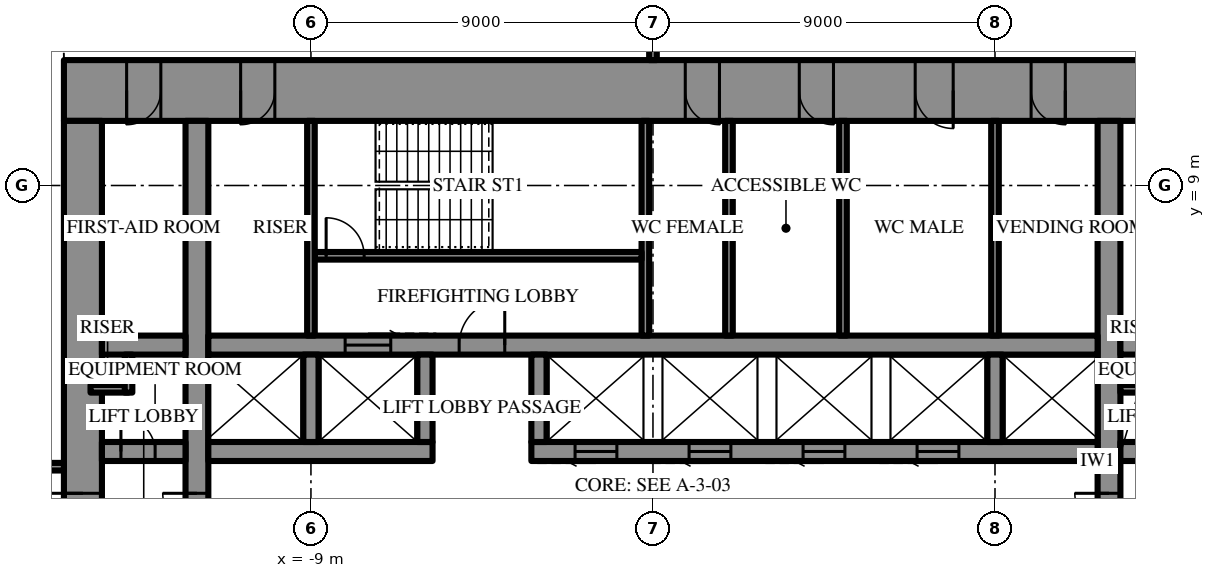
"""IFC4 building model, lengths in metres.
Left out: names, types, materials, properties, quantities, classifications, styles, units other than length and angle.
Written with IfcOpenShell. Run it as: python <this file> out.ifc"""

import sys

from ifc_helpers import new_model, si_unit, direction, frame, frame_2d, origin, place, context, subcontext, project, spatial, rectangle, extrude, element, fill, save


model = new_model("IFC4")
c1 = context("Model", 3, precision=1e-05, world=origin(), true_north=direction((0.0, 1.0)))
c2 = subcontext(c1, "Body", "Model", "MODEL_VIEW")
j1 = project(units=[si_unit("LENGTHUNIT", "METRE"), si_unit("PLANEANGLEUNIT", "RADIAN")], contexts=[c1])
p1 = place(None, origin())
s1 = spatial("IfcSite", under=j1, at=p1, CompositionType="ELEMENT")
p2 = place(p1, origin())
s2 = spatial("IfcBuilding", under=s1, at=p2, CompositionType="ELEMENT")
p3 = place(p2, frame((0.0, 0.0, 261.7)))
s3 = spatial("IfcBuildingStorey", under=s2, at=p3, CompositionType="ELEMENT", Elevation=261.7)
p4 = place(p3, frame((-15.5, 11.5, 0.0), z_axis=(0.0, 0.0, 1.0), x_axis=(1.0, 0.0, 0.0)))
e1 = element("IfcWall", 1, at=p4, inside=s3, PredefinedType="SHEAR", context=c2, shape_type="SweptSolid", body=[
    extrude(rectangle(XDim=31.0, YDim=1.6, at=frame_2d((15.5, 0.0))), origin(), (0.0, 0.0, 1.0), 4.2),
])
p5 = place(p4, frame((16.35, 0.0, 0.0)))
e2 = element("IfcOpeningElement", 2, at=p5, cuts=e1, PredefinedType="OPENING", context=c2, shape_type="SweptSolid", body=[
    extrude(rectangle(XDim=0.9, YDim=2.2, at=frame_2d((0.45, 1.1))), frame((0.0, 0.81, 0.0), z_axis=(0.0, -1.0, 0.0), x_axis=(1.0, 0.0, 0.0)), (0.0, 0.0, 1.0), 1.62),
])
p6 = place(p4, frame((19.35, 0.0, 0.0)))
e3 = element("IfcOpeningElement", 3, at=p6, cuts=e1, PredefinedType="OPENING", context=c2, shape_type="SweptSolid", body=[
    extrude(rectangle(XDim=0.9, YDim=2.2, at=frame_2d((0.45, 1.1))), frame((0.0, 0.81, 0.0), z_axis=(0.0, -1.0, 0.0), x_axis=(1.0, 0.0, 0.0)), (0.0, 0.0, 1.0), 1.62),
])
p7 = place(p4, frame((22.4, 0.0, 0.0)))
e4 = element("IfcOpeningElement", 4, at=p7, cuts=e1, PredefinedType="OPENING", context=c2, shape_type="SweptSolid", body=[
    extrude(rectangle(XDim=1.0, YDim=2.2, at=frame_2d((0.5, 1.1))), frame((0.0, 0.81, 0.0), z_axis=(0.0, -1.0, 0.0), x_axis=(1.0, 0.0, 0.0)), (0.0, 0.0, 1.0), 1.62),
])
p8 = place(p4, frame((1.65, 0.0, 0.0)))
e5 = element("IfcOpeningElement", 5, at=p8, cuts=e1, PredefinedType="OPENING", context=c2, shape_type="SweptSolid", body=[
    extrude(rectangle(XDim=0.9, YDim=2.2, at=frame_2d((0.45, 1.1))), frame((0.0, 0.81, 0.0), z_axis=(0.0, -1.0, 0.0), x_axis=(1.0, 0.0, 0.0)), (0.0, 0.0, 1.0), 1.62),
])
p9 = place(p4, frame((4.65, 0.0, 0.0)))
e6 = element("IfcOpeningElement", 6, at=p9, cuts=e1, PredefinedType="OPENING", context=c2, shape_type="SweptSolid", body=[
    extrude(rectangle(XDim=0.9, YDim=2.2, at=frame_2d((0.45, 1.1))), frame((0.0, 0.81, 0.0), z_axis=(0.0, -1.0, 0.0), x_axis=(1.0, 0.0, 0.0)), (0.0, 0.0, 1.0), 1.62),
])
p10 = place(p4, frame((25.45, 0.0, 0.0)))
e7 = element("IfcOpeningElement", 7, at=p10, cuts=e1, PredefinedType="OPENING", context=c2, shape_type="SweptSolid", body=[
    extrude(rectangle(XDim=0.9, YDim=2.2, at=frame_2d((0.45, 1.1))), frame((0.0, 0.81, 0.0), z_axis=(0.0, -1.0, 0.0), x_axis=(1.0, 0.0, 0.0)), (0.0, 0.0, 1.0), 1.62),
])
p11 = place(p4, frame((28.45, 0.0, 0.0)))
e8 = element("IfcOpeningElement", 8, at=p11, cuts=e1, PredefinedType="OPENING", context=c2, shape_type="SweptSolid", body=[
    extrude(rectangle(XDim=0.9, YDim=2.2, at=frame_2d((0.45, 1.1))), frame((0.0, 0.81, 0.0), z_axis=(0.0, -1.0, 0.0), x_axis=(1.0, 0.0, 0.0)), (0.0, 0.0, 1.0), 1.62),
])
p12 = place(p3, frame((-15.0, 10.7, 0.0), z_axis=(0.0, 0.0, 1.0), x_axis=(0.0, -1.0, 0.0)))
e9 = element("IfcWall", 9, at=p12, inside=s3, PredefinedType="SHEAR", context=c2, shape_type="SweptSolid", body=[
    extrude(rectangle(XDim=21.4, YDim=1.0, at=frame_2d((10.7, 0.0))), origin(), (0.0, 0.0, 1.0), 4.2),
])
p13 = place(p12, frame((9.8, 0.0, 0.0)))
e10 = element("IfcOpeningElement", 10, at=p13, cuts=e9, PredefinedType="OPENING", context=c2, shape_type="SweptSolid", body=[
    extrude(rectangle(XDim=1.8, YDim=2.4, at=frame_2d((0.9, 1.2))), frame((0.0, 0.51, 0.0), z_axis=(0.0, -1.0, 0.0), x_axis=(1.0, 0.0, 0.0)), (0.0, 0.0, 1.0), 1.02),
])
p14 = place(p3, frame((12.0, -10.7, 0.0), z_axis=(0.0, 0.0, 1.0), x_axis=(0.0, 1.0, 0.0)))
e11 = element("IfcWall", 11, at=p14, inside=s3, PredefinedType="SHEAR", context=c2, shape_type="SweptSolid", body=[
    extrude(rectangle(XDim=21.4, YDim=0.6, at=frame_2d((10.7, 0.0))), origin(), (0.0, 0.0, 1.0), 4.2),
])
p15 = place(p14, frame((9.8, 0.0, 0.0)))
e12 = element("IfcOpeningElement", 12, at=p15, cuts=e11, PredefinedType="OPENING", context=c2, shape_type="SweptSolid", body=[
    extrude(rectangle(XDim=1.8, YDim=2.4, at=frame_2d((0.9, 1.2))), frame((0.0, 0.31, 0.0), z_axis=(0.0, -1.0, 0.0), x_axis=(1.0, 0.0, 0.0)), (0.0, 0.0, 1.0), 0.62),
])
p16 = place(p3, frame((-12.0, -10.7, 0.0), z_axis=(0.0, 0.0, 1.0), x_axis=(0.0, 1.0, 0.0)))
e13 = element("IfcWall", 13, at=p16, inside=s3, PredefinedType="SHEAR", context=c2, shape_type="SweptSolid", body=[
    extrude(rectangle(XDim=21.4, YDim=0.6, at=frame_2d((10.7, 0.0))), origin(), (0.0, 0.0, 1.0), 4.2),
])
p17 = place(p16, frame((9.8, 0.0, 0.0)))
e14 = element("IfcOpeningElement", 14, at=p17, cuts=e13, PredefinedType="OPENING", context=c2, shape_type="SweptSolid", body=[
    extrude(rectangle(XDim=1.8, YDim=2.4, at=frame_2d((0.9, 1.2))), frame((0.0, 0.31, 0.0), z_axis=(0.0, -1.0, 0.0), x_axis=(1.0, 0.0, 0.0)), (0.0, 0.0, 1.0), 0.62),
])
p18 = place(p3, frame((-14.5, 2.0, 0.0), z_axis=(0.0, 0.0, 1.0), x_axis=(1.0, 0.0, 0.0)))
e15 = element("IfcWall", 15, at=p18, inside=s3, PredefinedType="SHEAR", context=c2, shape_type="SweptSolid", body=[
    extrude(rectangle(XDim=2.2, YDim=0.5, at=frame_2d((1.1, 0.0))), origin(), (0.0, 0.0, 1.0), 4.2),
])
p19 = place(p18, frame((0.5, 0.0, 0.0)))
e16 = element("IfcOpeningElement", 16, at=p19, cuts=e15, PredefinedType="OPENING", context=c2, shape_type="SweptSolid", body=[
    extrude(rectangle(XDim=0.9, YDim=2.2, at=frame_2d((0.45, 1.1))), frame((0.0, 0.26, 0.0), z_axis=(0.0, -1.0, 0.0), x_axis=(1.0, 0.0, 0.0)), (0.0, 0.0, 1.0), 0.52),
])
p20 = place(p3, frame((-11.7, 2.0, 0.0), z_axis=(0.0, 0.0, 1.0), x_axis=(1.0, 0.0, 0.0)))
e17 = element("IfcWall", 17, at=p20, inside=s3, PredefinedType="SHEAR", context=c2, shape_type="SweptSolid", body=[
    extrude(rectangle(XDim=5.9, YDim=0.5, at=frame_2d((2.95, 0.0))), origin(), (0.0, 0.0, 1.0), 4.2),
])
p21 = place(p3, frame((-3.2, 2.0, 0.0), z_axis=(0.0, 0.0, 1.0), x_axis=(1.0, 0.0, 0.0)))
e18 = element("IfcWall", 18, at=p21, inside=s3, PredefinedType="SHEAR", context=c2, shape_type="SweptSolid", body=[
    extrude(rectangle(XDim=14.9, YDim=0.5, at=frame_2d((7.45, 0.0))), origin(), (0.0, 0.0, 1.0), 4.2),
])
p22 = place(p21, frame((1.15, 0.0, 0.0)))
e19 = element("IfcOpeningElement", 19, at=p22, cuts=e18, PredefinedType="OPENING", context=c2, shape_type="SweptSolid", body=[
    extrude(rectangle(XDim=1.1, YDim=2.2, at=frame_2d((0.55, 1.1))), frame((0.0, 0.26, 0.0), z_axis=(0.0, -1.0, 0.0), x_axis=(1.0, 0.0, 0.0)), (0.0, 0.0, 1.0), 0.52),
])
p23 = place(p21, frame((4.15, 0.0, 0.0)))
e20 = element("IfcOpeningElement", 20, at=p23, cuts=e18, PredefinedType="OPENING", context=c2, shape_type="SweptSolid", body=[
    extrude(rectangle(XDim=1.1, YDim=2.2, at=frame_2d((0.55, 1.1))), frame((0.0, 0.26, 0.0), z_axis=(0.0, -1.0, 0.0), x_axis=(1.0, 0.0, 0.0)), (0.0, 0.0, 1.0), 0.52),
])
p24 = place(p21, frame((7.15, 0.0, 0.0)))
e21 = element("IfcOpeningElement", 21, at=p24, cuts=e18, PredefinedType="OPENING", context=c2, shape_type="SweptSolid", body=[
    extrude(rectangle(XDim=1.1, YDim=2.2, at=frame_2d((0.55, 1.1))), frame((0.0, 0.26, 0.0), z_axis=(0.0, -1.0, 0.0), x_axis=(1.0, 0.0, 0.0)), (0.0, 0.0, 1.0), 0.52),
])
p25 = place(p21, frame((10.15, 0.0, 0.0)))
e22 = element("IfcOpeningElement", 22, at=p25, cuts=e18, PredefinedType="OPENING", context=c2, shape_type="SweptSolid", body=[
    extrude(rectangle(XDim=1.1, YDim=2.2, at=frame_2d((0.55, 1.1))), frame((0.0, 0.26, 0.0), z_axis=(0.0, -1.0, 0.0), x_axis=(1.0, 0.0, 0.0)), (0.0, 0.0, 1.0), 0.52),
])
p26 = place(p3, frame((12.3, 2.0, 0.0), z_axis=(0.0, 0.0, 1.0), x_axis=(1.0, 0.0, 0.0)))
e23 = element("IfcWall", 23, at=p26, inside=s3, PredefinedType="SHEAR", context=c2, shape_type="SweptSolid", body=[
    extrude(rectangle(XDim=2.2, YDim=0.5, at=frame_2d((1.1, 0.0))), origin(), (0.0, 0.0, 1.0), 4.2),
])
p27 = place(p26, frame((0.8, 0.0, 0.0)))
e24 = element("IfcOpeningElement", 24, at=p27, cuts=e23, PredefinedType="OPENING", context=c2, shape_type="SweptSolid", body=[
    extrude(rectangle(XDim=0.9, YDim=2.2, at=frame_2d((0.45, 1.1))), frame((0.0, 0.26, 0.0), z_axis=(0.0, -1.0, 0.0), x_axis=(1.0, 0.0, 0.0)), (0.0, 0.0, 1.0), 0.52),
])
p28 = place(p3, frame((-14.5, 4.8, 0.0), z_axis=(0.0, 0.0, 1.0), x_axis=(1.0, 0.0, 0.0)))
e25 = element("IfcWall", 25, at=p28, inside=s3, PredefinedType="SHEAR", context=c2, shape_type="SweptSolid", body=[
    extrude(rectangle(XDim=2.2, YDim=0.5, at=frame_2d((1.1, 0.0))), origin(), (0.0, 0.0, 1.0), 4.2),
])
p29 = place(p3, frame((-11.7, 4.8, 0.0), z_axis=(0.0, 0.0, 1.0), x_axis=(1.0, 0.0, 0.0)))
e26 = element("IfcWall", 26, at=p29, inside=s3, PredefinedType="SHEAR", context=c2, shape_type="SweptSolid", body=[
    extrude(rectangle(XDim=23.4, YDim=0.5, at=frame_2d((11.7, 0.0))), origin(), (0.0, 0.0, 1.0), 4.2),
])
p30 = place(p29, frame((6.6, 0.0, 0.0)))
e27 = element("IfcOpeningElement", 27, at=p30, cuts=e26, PredefinedType="OPENING", context=c2, shape_type="SweptSolid", body=[
    extrude(rectangle(XDim=1.2, YDim=2.2, at=frame_2d((0.6, 1.1))), frame((0.0, 0.26, 0.0), z_axis=(0.0, -1.0, 0.0), x_axis=(1.0, 0.0, 0.0)), (0.0, 0.0, 1.0), 0.52),
])
p31 = place(p29, frame((3.6, 0.0, 0.0)))
e28 = element("IfcOpeningElement", 28, at=p31, cuts=e26, PredefinedType="OPENING", context=c2, shape_type="SweptSolid", body=[
    extrude(rectangle(XDim=1.2, YDim=2.2, at=frame_2d((0.6, 1.1))), frame((0.0, 0.26, 0.0), z_axis=(0.0, -1.0, 0.0), x_axis=(1.0, 0.0, 0.0)), (0.0, 0.0, 1.0), 0.52),
])
p32 = place(p3, frame((12.3, 4.8, 0.0), z_axis=(0.0, 0.0, 1.0), x_axis=(1.0, 0.0, 0.0)))
e29 = element("IfcWall", 29, at=p32, inside=s3, PredefinedType="SHEAR", context=c2, shape_type="SweptSolid", body=[
    extrude(rectangle(XDim=2.2, YDim=0.5, at=frame_2d((1.1, 0.0))), origin(), (0.0, 0.0, 1.0), 4.2),
])
for number, where, z_axis, x_axis in (
    (30, (-9.0, 2.25, 0.0), (0.0, 0.0, 1.0), (0.0, 1.0, 0.0)),
    (31, (-6.0, 2.25, 0.0), (0.0, 0.0, 1.0), (0.0, 1.0, 0.0)),
    (32, (-3.0, 2.25, 0.0), (0.0, 0.0, 1.0), (0.0, 1.0, 0.0)),
    (33, (9.0, 2.25, 0.0), (0.0, 0.0, 1.0), (0.0, 1.0, 0.0)),
):
    element("IfcWall", number, at=place(p3, frame(where, z_axis=z_axis, x_axis=x_axis)), inside=s3, PredefinedType="SHEAR", context=c2, shape_type="SweptSolid", body=[
        extrude(rectangle(XDim=2.3, YDim=0.4, at=frame_2d((1.15, 0.0))), origin(), (0.0, 0.0, 1.0), 4.2),
    ])
p33 = place(p3, frame((-0.2, 5.05, 0.0), z_axis=(0.0, 0.0, 1.0), x_axis=(0.0, 1.0, 0.0)))
e34 = element("IfcWall", 34, at=p33, inside=s3, PredefinedType="SHEAR", context=c2, shape_type="SweptSolid", body=[
    extrude(rectangle(XDim=5.65, YDim=0.2, at=frame_2d((2.825, 0.0))), origin(), (0.0, 0.0, 1.0), 4.2),
])
p34 = place(p3, frame((-8.9, 7.15, 0.0), z_axis=(0.0, 0.0, 1.0), x_axis=(1.0, 0.0, 0.0)))
e35 = element("IfcWall", 35, at=p34, inside=s3, PredefinedType="SHEAR", context=c2, shape_type="SweptSolid", body=[
    extrude(rectangle(XDim=8.6, YDim=0.2, at=frame_2d((4.3, 0.0))), origin(), (0.0, 0.0, 1.0), 4.2),
])
p35 = place(p34, frame((0.3, 0.0, 0.0)))
e36 = element("IfcOpeningElement", 36, at=p35, cuts=e35, PredefinedType="OPENING", context=c2, shape_type="SweptSolid", body=[
    extrude(rectangle(XDim=1.0, YDim=2.2, at=frame_2d((0.5, 1.1))), frame((0.0, 0.11, 0.0), z_axis=(0.0, -1.0, 0.0), x_axis=(1.0, 0.0, 0.0)), (0.0, 0.0, 1.0), 0.22),
])
for number, where, z_axis, x_axis in (
    (37, (-9.0, 5.05, 0.0), (0.0, 0.0, 1.0), (0.0, 1.0, 0.0)),
    (38, (9.0, 5.05, 0.0), (0.0, 0.0, 1.0), (0.0, 1.0, 0.0)),
    (39, (2.0, 5.05, 0.0), (0.0, 0.0, 1.0), (0.0, 1.0, 0.0)),
    (40, (5.0, 5.05, 0.0), (0.0, 0.0, 1.0), (0.0, 1.0, 0.0)),
):
    element("IfcWall", number, at=place(p3, frame(where, z_axis=z_axis, x_axis=x_axis)), inside=s3, PredefinedType="PARTITIONING", context=c2, shape_type="SweptSolid", body=[
        extrude(rectangle(XDim=5.65, YDim=0.2, at=frame_2d((2.825, 0.0))), origin(), (0.0, 0.0, 1.0), 4.0),
    ])
for number, where, z_axis, x_axis in (
    (41, (-14.8, 3.65, 0.0), (0.0, 0.0, 1.0), (1.0, 0.0, 0.0)),
    (42, (-13.8, 3.55, 0.0), (0.0, 0.0, 1.0), (0.0, 1.0, 0.0)),
    (43, (12.3, 3.65, 0.0), (0.0, 0.0, 1.0), (1.0, 0.0, 0.0)),
):
    element("IfcWall", number, at=place(p3, frame(where, z_axis=z_axis, x_axis=x_axis)), inside=s3, PredefinedType="PARTITIONING", context=c2, shape_type="SweptSolid", body=[
        extrude(rectangle(XDim=1.0, YDim=0.2, at=frame_2d((0.5, 0.0))), origin(), (0.0, 0.0, 1.0), 4.0),
    ])
p36 = place(p3, frame((-15.5, 1.6, 0.0), z_axis=(0.0, 0.0, 1.0), x_axis=(-1.0, 0.0, 0.0)))
e44 = element("IfcWall", 44, at=p36, inside=s3, PredefinedType="PARTITIONING", context=c2, shape_type="SweptSolid", body=[
    extrude(rectangle(XDim=11.7, YDim=0.2, at=frame_2d((5.85, 0.0))), origin(), (0.0, 0.0, 1.0), 4.0),
])
p37 = place(p36, frame((3.01, 0.0, 0.0)))
e45 = element("IfcOpeningElement", 45, at=p37, cuts=e44, PredefinedType="OPENING", context=c2, shape_type="SweptSolid", body=[
    extrude(rectangle(XDim=1.0, YDim=2.2, at=frame_2d((0.5, 1.1))), frame((0.0, 0.11, 0.0), z_axis=(0.0, -1.0, 0.0), x_axis=(1.0, 0.0, 0.0)), (0.0, 0.0, 1.0), 0.22),
])
p38 = place(p3, frame((0.0, 12.3, 0.0), z_axis=(0.0, 0.0, 1.0), x_axis=(0.0, 1.0, 0.0)))
e46 = element("IfcWall", 46, at=p38, inside=s3, PredefinedType="PARTITIONING", context=c2, shape_type="SweptSolid", body=[
    extrude(rectangle(XDim=15.55, YDim=0.2, at=frame_2d((7.775, 0.0))), origin(), (0.0, 0.0, 1.0), 2.992),
])
p39 = place(p38, frame((1.055, 0.0, 0.0)))
e47 = element("IfcOpeningElement", 47, at=p39, cuts=e46, PredefinedType="OPENING", context=c2, shape_type="SweptSolid", body=[
    extrude(rectangle(XDim=1.0, YDim=2.2, at=frame_2d((0.5, 1.1))), frame((0.0, 0.11, 0.0), z_axis=(0.0, -1.0, 0.0), x_axis=(1.0, 0.0, 0.0)), (0.0, 0.0, 1.0), 0.22),
])
p40 = place(p13, frame((1.8, 0.0, 0.0), z_axis=(0.0, 0.0, 1.0), x_axis=(-1.0, 0.0, 0.0)))
e48 = element("IfcDoor", 48, at=p40, inside=s3, OperationType="DOUBLE_DOOR_SINGLE_SWING", PredefinedType="DOOR", context=c2, shape_type="SweptSolid", body=[
    extrude(rectangle(XDim=1.8, YDim=2.4, at=frame_2d((0.9, 1.2))), frame((0.0, 0.025, 0.0), z_axis=(0.0, -1.0, 0.0), x_axis=(1.0, 0.0, 0.0)), (0.0, 0.0, 1.0), 0.05),
])
fill(e10, e48)
p41 = place(p30, origin())
e49 = element("IfcDoor", 49, at=p41, inside=s3, OperationType="SINGLE_SWING_LEFT", PredefinedType="DOOR", context=c2, shape_type="SweptSolid", body=[
    extrude(rectangle(XDim=1.2, YDim=2.2, at=frame_2d((0.6, 1.1))), frame((0.0, 0.025, 0.0), z_axis=(0.0, -1.0, 0.0), x_axis=(1.0, 0.0, 0.0)), (0.0, 0.0, 1.0), 0.05),
])
fill(e27, e49)
p42 = place(p35, origin())
e50 = element("IfcDoor", 50, at=p42, inside=s3, OperationType="SINGLE_SWING_RIGHT", PredefinedType="DOOR", context=c2, shape_type="SweptSolid", body=[
    extrude(rectangle(XDim=1.0, YDim=2.2, at=frame_2d((0.5, 1.1))), frame((0.0, 0.025, 0.0), z_axis=(0.0, -1.0, 0.0), x_axis=(1.0, 0.0, 0.0)), (0.0, 0.0, 1.0), 0.05),
])
fill(e36, e50)
p43 = place(p5, frame((0.9, 0.0, 0.0), z_axis=(0.0, 0.0, 1.0), x_axis=(-1.0, 0.0, 0.0)))
e51 = element("IfcDoor", 51, at=p43, inside=s3, OperationType="SINGLE_SWING_RIGHT", PredefinedType="DOOR", context=c2, shape_type="SweptSolid", body=[
    extrude(rectangle(XDim=0.9, YDim=2.2, at=frame_2d((0.45, 1.1))), frame((0.0, 0.025, 0.0), z_axis=(0.0, -1.0, 0.0), x_axis=(1.0, 0.0, 0.0)), (0.0, 0.0, 1.0), 0.05),
])
fill(e2, e51)
p44 = place(p6, frame((0.9, 0.0, 0.0), z_axis=(0.0, 0.0, 1.0), x_axis=(-1.0, 0.0, 0.0)))
e52 = element("IfcDoor", 52, at=p44, inside=s3, OperationType="SINGLE_SWING_RIGHT", PredefinedType="DOOR", context=c2, shape_type="SweptSolid", body=[
    extrude(rectangle(XDim=0.9, YDim=2.2, at=frame_2d((0.45, 1.1))), frame((0.0, 0.025, 0.0), z_axis=(0.0, -1.0, 0.0), x_axis=(1.0, 0.0, 0.0)), (0.0, 0.0, 1.0), 0.05),
])
fill(e3, e52)
p45 = place(p7, frame((1.0, 0.0, 0.0), z_axis=(0.0, 0.0, 1.0), x_axis=(-1.0, 0.0, 0.0)))
e53 = element("IfcDoor", 53, at=p45, inside=s3, OperationType="SINGLE_SWING_RIGHT", PredefinedType="DOOR", context=c2, shape_type="SweptSolid", body=[
    extrude(rectangle(XDim=1.0, YDim=2.2, at=frame_2d((0.5, 1.1))), frame((0.0, 0.025, 0.0), z_axis=(0.0, -1.0, 0.0), x_axis=(1.0, 0.0, 0.0)), (0.0, 0.0, 1.0), 0.05),
])
fill(e4, e53)
p46 = place(p8, frame((0.9, 0.0, 0.0), z_axis=(0.0, 0.0, 1.0), x_axis=(-1.0, 0.0, 0.0)))
e54 = element("IfcDoor", 54, at=p46, inside=s3, OperationType="SINGLE_SWING_LEFT", PredefinedType="DOOR", context=c2, shape_type="SweptSolid", body=[
    extrude(rectangle(XDim=0.9, YDim=2.2, at=frame_2d((0.45, 1.1))), frame((0.0, 0.025, 0.0), z_axis=(0.0, -1.0, 0.0), x_axis=(1.0, 0.0, 0.0)), (0.0, 0.0, 1.0), 0.05),
])
fill(e5, e54)
p47 = place(p9, frame((0.9, 0.0, 0.0), z_axis=(0.0, 0.0, 1.0), x_axis=(-1.0, 0.0, 0.0)))
e55 = element("IfcDoor", 55, at=p47, inside=s3, OperationType="SINGLE_SWING_LEFT", PredefinedType="DOOR", context=c2, shape_type="SweptSolid", body=[
    extrude(rectangle(XDim=0.9, YDim=2.2, at=frame_2d((0.45, 1.1))), frame((0.0, 0.025, 0.0), z_axis=(0.0, -1.0, 0.0), x_axis=(1.0, 0.0, 0.0)), (0.0, 0.0, 1.0), 0.05),
])
fill(e6, e55)
p48 = place(p10, frame((0.9, 0.0, 0.0), z_axis=(0.0, 0.0, 1.0), x_axis=(-1.0, 0.0, 0.0)))
e56 = element("IfcDoor", 56, at=p48, inside=s3, OperationType="SINGLE_SWING_RIGHT", PredefinedType="DOOR", context=c2, shape_type="SweptSolid", body=[
    extrude(rectangle(XDim=0.9, YDim=2.2, at=frame_2d((0.45, 1.1))), frame((0.0, 0.025, 0.0), z_axis=(0.0, -1.0, 0.0), x_axis=(1.0, 0.0, 0.0)), (0.0, 0.0, 1.0), 0.05),
])
fill(e7, e56)
p49 = place(p19, origin())
e57 = element("IfcDoor", 57, at=p49, inside=s3, OperationType="SINGLE_SWING_RIGHT", PredefinedType="DOOR", context=c2, shape_type="SweptSolid", body=[
    extrude(rectangle(XDim=0.9, YDim=2.2, at=frame_2d((0.45, 1.1))), frame((0.0, 0.025, 0.0), z_axis=(0.0, -1.0, 0.0), x_axis=(1.0, 0.0, 0.0)), (0.0, 0.0, 1.0), 0.05),
])
fill(e16, e57)
p50 = place(p15, origin())
e58 = element("IfcDoor", 58, at=p50, inside=s3, OperationType="DOUBLE_DOOR_SINGLE_SWING", PredefinedType="DOOR", context=c2, shape_type="SweptSolid", body=[
    extrude(rectangle(XDim=1.8, YDim=2.4, at=frame_2d((0.9, 1.2))), frame((0.0, 0.025, 0.0), z_axis=(0.0, -1.0, 0.0), x_axis=(1.0, 0.0, 0.0)), (0.0, 0.0, 1.0), 0.05),
])
fill(e12, e58)
p51 = place(p17, origin())
e59 = element("IfcDoor", 59, at=p51, inside=s3, OperationType="DOUBLE_DOOR_SINGLE_SWING", PredefinedType="DOOR", context=c2, shape_type="SweptSolid", body=[
    extrude(rectangle(XDim=1.8, YDim=2.4, at=frame_2d((0.9, 1.2))), frame((0.0, 0.025, 0.0), z_axis=(0.0, -1.0, 0.0), x_axis=(1.0, 0.0, 0.0)), (0.0, 0.0, 1.0), 0.05),
])
fill(e14, e59)
p52 = place(p31, origin())
e60 = element("IfcDoor", 60, at=p52, inside=s3, OperationType="SLIDING_TO_LEFT", PredefinedType="DOOR", context=c2, shape_type="SweptSolid", body=[
    extrude(rectangle(XDim=1.2, YDim=2.2, at=frame_2d((0.6, 1.1))), frame((0.0, 0.025, 0.0), z_axis=(0.0, -1.0, 0.0), x_axis=(1.0, 0.0, 0.0)), (0.0, 0.0, 1.0), 0.05),
])
fill(e28, e60)
p53 = place(p22, frame((1.1, 0.0, 0.0), z_axis=(0.0, 0.0, 1.0), x_axis=(-1.0, 0.0, 0.0)))
e61 = element("IfcDoor", 61, at=p53, inside=s3, OperationType="SLIDING_TO_LEFT", PredefinedType="DOOR", context=c2, shape_type="SweptSolid", body=[
    extrude(rectangle(XDim=1.1, YDim=2.2, at=frame_2d((0.55, 1.1))), frame((0.0, 0.025, 0.0), z_axis=(0.0, -1.0, 0.0), x_axis=(1.0, 0.0, 0.0)), (0.0, 0.0, 1.0), 0.05),
])
fill(e19, e61)
p54 = place(p23, frame((1.1, 0.0, 0.0), z_axis=(0.0, 0.0, 1.0), x_axis=(-1.0, 0.0, 0.0)))
e62 = element("IfcDoor", 62, at=p54, inside=s3, OperationType="SLIDING_TO_LEFT", PredefinedType="DOOR", context=c2, shape_type="SweptSolid", body=[
    extrude(rectangle(XDim=1.1, YDim=2.2, at=frame_2d((0.55, 1.1))), frame((0.0, 0.025, 0.0), z_axis=(0.0, -1.0, 0.0), x_axis=(1.0, 0.0, 0.0)), (0.0, 0.0, 1.0), 0.05),
])
fill(e20, e62)
p55 = place(p24, frame((1.1, 0.0, 0.0), z_axis=(0.0, 0.0, 1.0), x_axis=(-1.0, 0.0, 0.0)))
e63 = element("IfcDoor", 63, at=p55, inside=s3, OperationType="SLIDING_TO_LEFT", PredefinedType="DOOR", context=c2, shape_type="SweptSolid", body=[
    extrude(rectangle(XDim=1.1, YDim=2.2, at=frame_2d((0.55, 1.1))), frame((0.0, 0.025, 0.0), z_axis=(0.0, -1.0, 0.0), x_axis=(1.0, 0.0, 0.0)), (0.0, 0.0, 1.0), 0.05),
])
fill(e21, e63)
p56 = place(p25, frame((1.1, 0.0, 0.0), z_axis=(0.0, 0.0, 1.0), x_axis=(-1.0, 0.0, 0.0)))
e64 = element("IfcDoor", 64, at=p56, inside=s3, OperationType="SLIDING_TO_LEFT", PredefinedType="DOOR", context=c2, shape_type="SweptSolid", body=[
    extrude(rectangle(XDim=1.1, YDim=2.2, at=frame_2d((0.55, 1.1))), frame((0.0, 0.025, 0.0), z_axis=(0.0, -1.0, 0.0), x_axis=(1.0, 0.0, 0.0)), (0.0, 0.0, 1.0), 0.05),
])
fill(e22, e64)
save(model, sys.argv[1])
